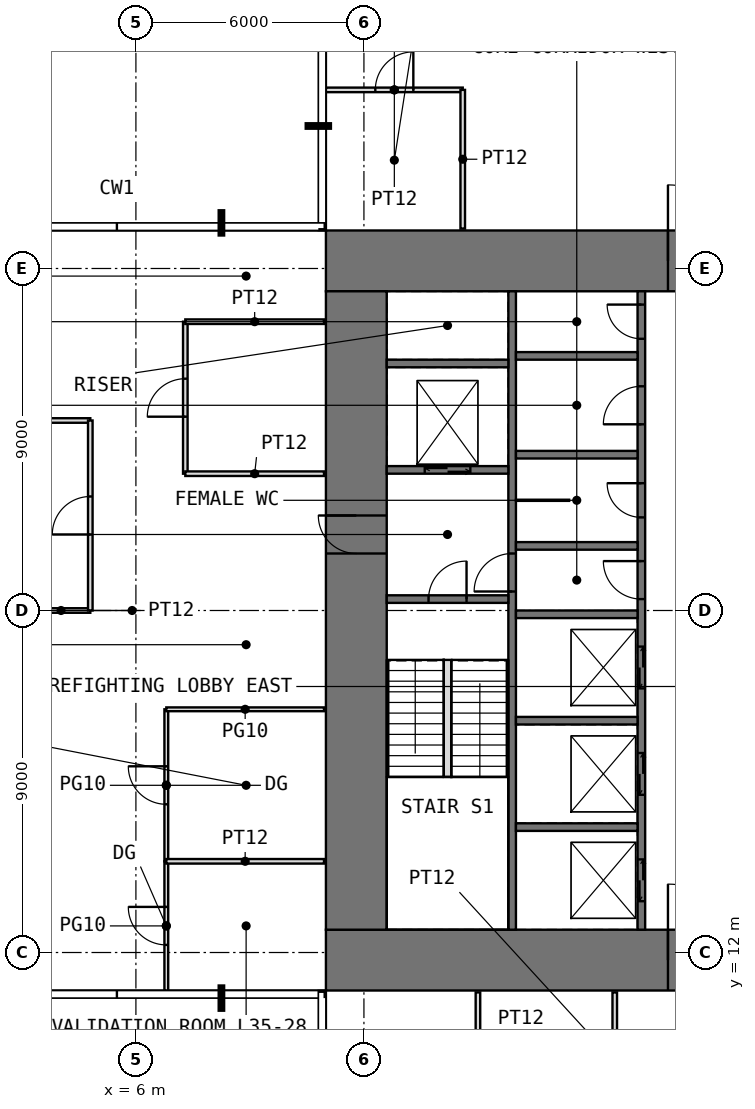
"""IFC4 building model, lengths in metres.
Left out: names, types, materials, properties, quantities, classifications, styles, units other than length and angle.
Written with IfcOpenShell. Run it as: python <this file> out.ifc"""

import sys

from ifc_helpers import new_model, si_unit, direction, frame, frame_2d, origin, place, context, subcontext, project, spatial, rectangle, extrude, element, fill, save


model = new_model("IFC4")
c1 = context("Model", 3, precision=1e-05, world=origin(), true_north=direction((0.0, 1.0)))
c2 = subcontext(c1, "Body", "Model", "MODEL_VIEW")
j1 = project(units=[si_unit("LENGTHUNIT", "METRE"), si_unit("PLANEANGLEUNIT", "RADIAN")], contexts=[c1])
p1 = place(None, origin())
s1 = spatial("IfcSite", under=j1, at=p1, CompositionType="ELEMENT")
p2 = place(p1, origin())
s2 = spatial("IfcBuilding", under=s1, at=p2, CompositionType="ELEMENT")
p3 = place(p2, frame((0.0, 0.0, 148.5)))
s3 = spatial("IfcBuildingStorey", under=s2, at=p3, CompositionType="ELEMENT", Elevation=148.5)
p4 = place(p3, frame((11.0, 11.8, -0.05), z_axis=(0.0, 0.0, 1.0), x_axis=(1.0, 0.0, 0.0)))
e1 = element("IfcWall", 1, at=p4, inside=s3, PredefinedType="SHEAR", context=c2, shape_type="SweptSolid", body=[
    extrude(rectangle(XDim=20.0, YDim=1.6, at=frame_2d((10.0, 0.0))), origin(), (0.0, 0.0, 1.0), 4.0),
])
p5 = place(p4, frame((9.0, 0.0, 0.05)))
e2 = element("IfcOpeningElement", 2, at=p5, cuts=e1, PredefinedType="OPENING", context=c2, shape_type="SweptSolid", body=[
    extrude(rectangle(XDim=2.0, YDim=2.2, at=frame_2d((1.0, 1.1))), frame((0.0, 0.81, 0.0), z_axis=(0.0, -1.0, 0.0), x_axis=(1.0, 0.0, 0.0)), (0.0, 0.0, 1.0), 1.62),
])
p6 = place(p3, frame((11.0, 30.2, -0.05), z_axis=(0.0, 0.0, 1.0), x_axis=(1.0, 0.0, 0.0)))
e3 = element("IfcWall", 3, at=p6, inside=s3, PredefinedType="SHEAR", context=c2, shape_type="SweptSolid", body=[
    extrude(rectangle(XDim=20.0, YDim=1.6, at=frame_2d((10.0, 0.0))), origin(), (0.0, 0.0, 1.0), 4.0),
])
p7 = place(p6, frame((9.0, 0.0, 0.05)))
e4 = element("IfcOpeningElement", 4, at=p7, cuts=e3, PredefinedType="OPENING", context=c2, shape_type="SweptSolid", body=[
    extrude(rectangle(XDim=2.0, YDim=2.2, at=frame_2d((1.0, 1.1))), frame((0.0, 0.81, 0.0), z_axis=(0.0, -1.0, 0.0), x_axis=(1.0, 0.0, 0.0)), (0.0, 0.0, 1.0), 1.62),
])
p8 = place(p3, frame((11.8, 12.6, -0.05), z_axis=(0.0, 0.0, 1.0), x_axis=(0.0, 1.0, 0.0)))
e5 = element("IfcWall", 5, at=p8, inside=s3, PredefinedType="SHEAR", context=c2, shape_type="SweptSolid", body=[
    extrude(rectangle(XDim=16.8, YDim=1.6, at=frame_2d((8.4, 0.0))), origin(), (0.0, 0.0, 1.0), 4.0),
])
p9 = place(p8, frame((9.9, 0.0, 0.05)))
e6 = element("IfcOpeningElement", 6, at=p9, cuts=e5, PredefinedType="OPENING", context=c2, shape_type="SweptSolid", body=[
    extrude(rectangle(XDim=1.0, YDim=2.2, at=frame_2d((0.5, 1.1))), frame((0.0, 0.81, 0.0), z_axis=(0.0, -1.0, 0.0), x_axis=(1.0, 0.0, 0.0)), (0.0, 0.0, 1.0), 1.62),
])
p10 = place(p3, frame((15.9, 12.6, -0.05), z_axis=(0.0, 0.0, 1.0), x_axis=(0.0, 1.0, 0.0)))
e7 = element("IfcWall", 7, at=p10, inside=s3, PredefinedType="SHEAR", context=c2, shape_type="SweptSolid", body=[
    extrude(rectangle(XDim=16.8, YDim=0.2, at=frame_2d((8.4, 0.0))), origin(), (0.0, 0.0, 1.0), 4.0),
])
p11 = place(p10, frame((8.9, 0.0, 0.05)))
e8 = element("IfcOpeningElement", 8, at=p11, cuts=e7, PredefinedType="OPENING", context=c2, shape_type="SweptSolid", body=[
    extrude(rectangle(XDim=1.0, YDim=2.2, at=frame_2d((0.5, 1.1))), frame((0.0, 0.11, 0.0), z_axis=(0.0, -1.0, 0.0), x_axis=(1.0, 0.0, 0.0)), (0.0, 0.0, 1.0), 0.22),
])
p12 = place(p3, frame((19.3, 12.6, -0.05), z_axis=(0.0, 0.0, 1.0), x_axis=(0.0, 1.0, 0.0)))
e9 = element("IfcWall", 9, at=p12, inside=s3, PredefinedType="SHEAR", context=c2, shape_type="SweptSolid", body=[
    extrude(rectangle(XDim=16.8, YDim=0.2, at=frame_2d((8.4, 0.0))), origin(), (0.0, 0.0, 1.0), 4.0),
])
p13 = place(p12, frame((8.7, 0.0, 0.05)))
e10 = element("IfcOpeningElement", 10, at=p13, cuts=e9, PredefinedType="OPENING", context=c2, shape_type="SweptSolid", body=[
    extrude(rectangle(XDim=1.0, YDim=2.2, at=frame_2d((0.5, 1.1))), frame((0.0, 0.11, 0.0), z_axis=(0.0, -1.0, 0.0), x_axis=(1.0, 0.0, 0.0)), (0.0, 0.0, 1.0), 0.22),
])
p14 = place(p12, frame((10.85, 0.0, 0.05)))
e11 = element("IfcOpeningElement", 11, at=p14, cuts=e9, PredefinedType="OPENING", context=c2, shape_type="SweptSolid", body=[
    extrude(rectangle(XDim=0.9, YDim=2.2, at=frame_2d((0.45, 1.1))), frame((0.0, 0.11, 0.0), z_axis=(0.0, -1.0, 0.0), x_axis=(1.0, 0.0, 0.0)), (0.0, 0.0, 1.0), 0.22),
])
p15 = place(p12, frame((13.3, 0.0, 0.05)))
e12 = element("IfcOpeningElement", 12, at=p15, cuts=e9, PredefinedType="OPENING", context=c2, shape_type="SweptSolid", body=[
    extrude(rectangle(XDim=1.0, YDim=2.2, at=frame_2d((0.5, 1.1))), frame((0.0, 0.11, 0.0), z_axis=(0.0, -1.0, 0.0), x_axis=(1.0, 0.0, 0.0)), (0.0, 0.0, 1.0), 0.22),
])
p16 = place(p12, frame((15.55, 0.0, 0.05)))
e13 = element("IfcOpeningElement", 13, at=p16, cuts=e9, PredefinedType="OPENING", context=c2, shape_type="SweptSolid", body=[
    extrude(rectangle(XDim=0.9, YDim=2.2, at=frame_2d((0.45, 1.1))), frame((0.0, 0.11, 0.0), z_axis=(0.0, -1.0, 0.0), x_axis=(1.0, 0.0, 0.0)), (0.0, 0.0, 1.0), 0.22),
])
p17 = place(p12, frame((0.75, 0.0, 0.05)))
e14 = element("IfcOpeningElement", 14, at=p17, cuts=e9, PredefinedType="OPENING", context=c2, shape_type="SweptSolid", body=[
    extrude(rectangle(XDim=1.1, YDim=2.2, at=frame_2d((0.55, 1.1))), frame((0.0, 0.11, 0.0), z_axis=(0.0, -1.0, 0.0), x_axis=(1.0, 0.0, 0.0)), (0.0, 0.0, 1.0), 0.22),
])
p18 = place(p12, frame((3.55, 0.0, 0.05)))
e15 = element("IfcOpeningElement", 15, at=p18, cuts=e9, PredefinedType="OPENING", context=c2, shape_type="SweptSolid", body=[
    extrude(rectangle(XDim=1.1, YDim=2.2, at=frame_2d((0.55, 1.1))), frame((0.0, 0.11, 0.0), z_axis=(0.0, -1.0, 0.0), x_axis=(1.0, 0.0, 0.0)), (0.0, 0.0, 1.0), 0.22),
])
p19 = place(p12, frame((6.35, 0.0, 0.05)))
e16 = element("IfcOpeningElement", 16, at=p19, cuts=e9, PredefinedType="OPENING", context=c2, shape_type="SweptSolid", body=[
    extrude(rectangle(XDim=1.1, YDim=2.2, at=frame_2d((0.55, 1.1))), frame((0.0, 0.11, 0.0), z_axis=(0.0, -1.0, 0.0), x_axis=(1.0, 0.0, 0.0)), (0.0, 0.0, 1.0), 0.22),
])
p20 = place(p3, frame((12.6, 21.3, -0.05), z_axis=(0.0, 0.0, 1.0), x_axis=(1.0, 0.0, 0.0)))
e17 = element("IfcWall", 17, at=p20, inside=s3, PredefinedType="SHEAR", context=c2, shape_type="SweptSolid", body=[
    extrude(rectangle(XDim=3.2, YDim=0.2, at=frame_2d((1.6, 0.0))), origin(), (0.0, 0.0, 1.0), 4.0),
])
p21 = place(p20, frame((1.1, 0.0, 0.05)))
e18 = element("IfcOpeningElement", 18, at=p21, cuts=e17, PredefinedType="OPENING", context=c2, shape_type="SweptSolid", body=[
    extrude(rectangle(XDim=1.0, YDim=2.2, at=frame_2d((0.5, 1.1))), frame((0.0, 0.11, 0.0), z_axis=(0.0, -1.0, 0.0), x_axis=(1.0, 0.0, 0.0)), (0.0, 0.0, 1.0), 0.22),
])
p22 = place(p3, frame((12.6, 24.7, -0.05), z_axis=(0.0, 0.0, 1.0), x_axis=(1.0, 0.0, 0.0)))
e19 = element("IfcWall", 19, at=p22, inside=s3, PredefinedType="SHEAR", context=c2, shape_type="SweptSolid", body=[
    extrude(rectangle(XDim=3.2, YDim=0.2, at=frame_2d((1.6, 0.0))), origin(), (0.0, 0.0, 1.0), 4.0),
])
p23 = place(p22, frame((1.0, 0.0, 0.05)))
e20 = element("IfcOpeningElement", 20, at=p23, cuts=e19, PredefinedType="OPENING", context=c2, shape_type="SweptSolid", body=[
    extrude(rectangle(XDim=1.2, YDim=2.2, at=frame_2d((0.6, 1.1))), frame((0.0, 0.11, 0.0), z_axis=(0.0, -1.0, 0.0), x_axis=(1.0, 0.0, 0.0)), (0.0, 0.0, 1.0), 0.22),
])
for number, where, z_axis, x_axis in (
    (21, (12.6, 27.5, -0.05), (0.0, 0.0, 1.0), (1.0, 0.0, 0.0)),
    (22, (16.0, 15.3, -0.05), (0.0, 0.0, 1.0), (1.0, 0.0, 0.0)),
    (23, (16.0, 18.1, -0.05), (0.0, 0.0, 1.0), (1.0, 0.0, 0.0)),
    (24, (16.0, 20.9, -0.05), (0.0, 0.0, 1.0), (1.0, 0.0, 0.0)),
    (25, (16.0, 22.7, -0.05), (0.0, 0.0, 1.0), (1.0, 0.0, 0.0)),
    (26, (16.0, 25.1, -0.05), (0.0, 0.0, 1.0), (1.0, 0.0, 0.0)),
    (27, (16.0, 27.7, -0.05), (0.0, 0.0, 1.0), (1.0, 0.0, 0.0)),
):
    element("IfcWall", number, at=place(p3, frame(where, z_axis=z_axis, x_axis=x_axis)), inside=s3, PredefinedType="SHEAR", context=c2, shape_type="SweptSolid", body=[
        extrude(rectangle(XDim=3.2, YDim=0.2, at=frame_2d((1.6, 0.0))), origin(), (0.0, 0.0, 1.0), 4.0),
    ])
p24 = place(p3, frame((16.0, 23.9, 0.0), z_axis=(0.0, 0.0, 1.0), x_axis=(1.0, 0.0, 0.0)))
e28 = element("IfcWall", 28, at=p24, inside=s3, PredefinedType="PARTITIONING", context=c2, shape_type="SweptSolid", body=[
    extrude(rectangle(XDim=1.4, YDim=0.03, at=frame_2d((0.7, 0.0))), origin(), (0.0, 0.0, 1.0), 3.75),
])
p25 = place(p3, frame((1.26, 26.0, 0.0), z_axis=(0.0, 0.0, 1.0), x_axis=(1.0, 0.0, 0.0)))
e29 = element("IfcWall", 29, at=p25, inside=s3, PredefinedType="PARTITIONING", context=c2, shape_type="SweptSolid", body=[
    extrude(rectangle(XDim=3.54, YDim=0.12, at=frame_2d((1.77, 0.0))), origin(), (0.0, 0.0, 1.0), 3.75),
])
p26 = place(p3, frame((3.26, 21.0, 0.0), z_axis=(0.0, 0.0, 1.0), x_axis=(1.0, 0.0, 0.0)))
e30 = element("IfcWall", 30, at=p26, inside=s3, PredefinedType="PARTITIONING", context=c2, shape_type="SweptSolid", body=[
    extrude(rectangle(XDim=1.54, YDim=0.12, at=frame_2d((0.77, 0.0))), origin(), (0.0, 0.0, 1.0), 3.75),
])
p27 = place(p3, frame((4.8, 21.0, 0.0), z_axis=(0.0, 0.0, 1.0), x_axis=(0.0, 1.0, 0.0)))
e31 = element("IfcWall", 31, at=p27, inside=s3, PredefinedType="PARTITIONING", context=c2, shape_type="SweptSolid", body=[
    extrude(rectangle(XDim=5.0, YDim=0.12, at=frame_2d((2.5, 0.0))), origin(), (0.0, 0.0, 1.0), 3.75),
])
p28 = place(p27, frame((2.0, 0.0, 0.0)))
e32 = element("IfcOpeningElement", 32, at=p28, cuts=e31, PredefinedType="OPENING", context=c2, shape_type="SweptSolid", body=[
    extrude(rectangle(XDim=1.0, YDim=2.2, at=frame_2d((0.5, 1.1))), frame((0.0, 0.07, 0.0), z_axis=(0.0, -1.0, 0.0), x_axis=(1.0, 0.0, 0.0)), (0.0, 0.0, 1.0), 0.14),
])
p29 = place(p3, frame((6.8, 11.0, 0.0), z_axis=(0.0, 0.0, 1.0), x_axis=(0.0, 1.0, 0.0)))
e33 = element("IfcWall", 33, at=p29, inside=s3, PredefinedType="PARTITIONING", context=c2, shape_type="SweptSolid", body=[
    extrude(rectangle(XDim=3.4, YDim=0.1, at=frame_2d((1.7, 0.0))), origin(), (0.0, 0.0, 1.0), 3.75),
])
p30 = place(p29, frame((1.2, 0.0, 0.0)))
e34 = element("IfcOpeningElement", 34, at=p30, cuts=e33, PredefinedType="OPENING", context=c2, shape_type="SweptSolid", body=[
    extrude(rectangle(XDim=1.0, YDim=2.4, at=frame_2d((0.5, 1.2))), frame((0.0, 0.06, 0.0), z_axis=(0.0, -1.0, 0.0), x_axis=(1.0, 0.0, 0.0)), (0.0, 0.0, 1.0), 0.12),
])
p31 = place(p3, frame((6.8, 14.4, 0.0), z_axis=(0.0, 0.0, 1.0), x_axis=(0.0, 1.0, 0.0)))
e35 = element("IfcWall", 35, at=p31, inside=s3, PredefinedType="PARTITIONING", context=c2, shape_type="SweptSolid", body=[
    extrude(rectangle(XDim=4.0, YDim=0.1, at=frame_2d((2.0, 0.0))), origin(), (0.0, 0.0, 1.0), 3.75),
])
p32 = place(p31, frame((1.5, 0.0, 0.0)))
e36 = element("IfcOpeningElement", 36, at=p32, cuts=e35, PredefinedType="OPENING", context=c2, shape_type="SweptSolid", body=[
    extrude(rectangle(XDim=1.0, YDim=2.4, at=frame_2d((0.5, 1.2))), frame((0.0, 0.06, 0.0), z_axis=(0.0, -1.0, 0.0), x_axis=(1.0, 0.0, 0.0)), (0.0, 0.0, 1.0), 0.12),
])
p33 = place(p3, frame((6.8, 14.4, 0.0), z_axis=(0.0, 0.0, 1.0), x_axis=(1.0, 0.0, 0.0)))
e37 = element("IfcWall", 37, at=p33, inside=s3, PredefinedType="PARTITIONING", context=c2, shape_type="SweptSolid", body=[
    extrude(rectangle(XDim=4.15, YDim=0.12, at=frame_2d((2.075, 0.0))), origin(), (0.0, 0.0, 1.0), 3.75),
])
p34 = place(p3, frame((6.8, 18.4, 0.0), z_axis=(0.0, 0.0, 1.0), x_axis=(1.0, 0.0, 0.0)))
e38 = element("IfcWall", 38, at=p34, inside=s3, PredefinedType="PARTITIONING", context=c2, shape_type="SweptSolid", body=[
    extrude(rectangle(XDim=4.15, YDim=0.1, at=frame_2d((2.075, 0.0))), origin(), (0.0, 0.0, 1.0), 3.75),
])
p35 = place(p3, frame((7.3, 24.6, 0.0), z_axis=(0.0, 0.0, 1.0), x_axis=(0.0, 1.0, 0.0)))
e39 = element("IfcWall", 39, at=p35, inside=s3, PredefinedType="PARTITIONING", context=c2, shape_type="SweptSolid", body=[
    extrude(rectangle(XDim=4.0, YDim=0.12, at=frame_2d((2.0, 0.0))), origin(), (0.0, 0.0, 1.0), 3.75),
])
p36 = place(p35, frame((1.5, 0.0, 0.0)))
e40 = element("IfcOpeningElement", 40, at=p36, cuts=e39, PredefinedType="OPENING", context=c2, shape_type="SweptSolid", body=[
    extrude(rectangle(XDim=1.0, YDim=2.2, at=frame_2d((0.5, 1.1))), frame((0.0, 0.07, 0.0), z_axis=(0.0, -1.0, 0.0), x_axis=(1.0, 0.0, 0.0)), (0.0, 0.0, 1.0), 0.14),
])
for number, where, z_axis, x_axis in (
    (41, (7.3, 24.6, 0.0), (0.0, 0.0, 1.0), (1.0, 0.0, 0.0)),
    (42, (7.3, 28.6, 0.0), (0.0, 0.0, 1.0), (1.0, 0.0, 0.0)),
):
    element("IfcWall", number, at=place(p3, frame(where, z_axis=z_axis, x_axis=x_axis)), inside=s3, PredefinedType="PARTITIONING", context=c2, shape_type="SweptSolid", body=[
        extrude(rectangle(XDim=3.65, YDim=0.12, at=frame_2d((1.825, 0.0))), origin(), (0.0, 0.0, 1.0), 3.75),
    ])
p37 = place(p3, frame((11.0, 34.7, 0.0), z_axis=(0.0, 0.0, 1.0), x_axis=(1.0, 0.0, 0.0)))
e43 = element("IfcWall", 43, at=p37, inside=s3, PredefinedType="PARTITIONING", context=c2, shape_type="SweptSolid", body=[
    extrude(rectangle(XDim=3.6, YDim=0.12, at=frame_2d((1.8, 0.0))), origin(), (0.0, 0.0, 1.0), 3.75),
])
p38 = place(p37, frame((1.3, 0.0, 0.0)))
e44 = element("IfcOpeningElement", 44, at=p38, cuts=e43, PredefinedType="OPENING", context=c2, shape_type="SweptSolid", body=[
    extrude(rectangle(XDim=1.0, YDim=2.2, at=frame_2d((0.5, 1.1))), frame((0.0, 0.07, 0.0), z_axis=(0.0, -1.0, 0.0), x_axis=(1.0, 0.0, 0.0)), (0.0, 0.0, 1.0), 0.14),
])
for number, where, z_axis, x_axis in (
    (45, (14.6, 31.05, 0.0), (0.0, 0.0, 1.0), (0.0, 1.0, 0.0)),
    (46, (15.0, 7.3, 0.0), (0.0, 0.0, 1.0), (0.0, 1.0, 0.0)),
    (47, (18.6, 7.3, 0.0), (0.0, 0.0, 1.0), (0.0, 1.0, 0.0)),
):
    element("IfcWall", number, at=place(p3, frame(where, z_axis=z_axis, x_axis=x_axis)), inside=s3, PredefinedType="PARTITIONING", context=c2, shape_type="SweptSolid", body=[
        extrude(rectangle(XDim=3.65, YDim=0.12, at=frame_2d((1.825, 0.0))), origin(), (0.0, 0.0, 1.0), 3.75),
    ])
p39 = place(p3, frame((14.2, 16.62, 0.0), z_axis=(0.0, 0.0, 1.0), x_axis=(0.0, 1.0, 0.0)))
e48 = element("IfcWall", 48, at=p39, inside=s3, PredefinedType="PARTITIONING", context=c2, shape_type="SweptSolid", body=[
    extrude(rectangle(XDim=3.08, YDim=0.2, at=frame_2d((1.54, 0.0))), origin(), (0.0, 0.0, 1.0), 4.0),
])
p40 = place(p5, origin())
e49 = element("IfcDoor", 49, at=p40, inside=s3, OperationType="DOUBLE_DOOR_SINGLE_SWING", PredefinedType="DOOR", context=c2, shape_type="SweptSolid", body=[
    extrude(rectangle(XDim=2.0, YDim=2.2, at=frame_2d((1.0, 1.1))), frame((0.0, 0.025, 0.0), z_axis=(0.0, -1.0, 0.0), x_axis=(1.0, 0.0, 0.0)), (0.0, 0.0, 1.0), 0.05),
])
fill(e2, e49)
p41 = place(p7, origin())
e50 = element("IfcDoor", 50, at=p41, inside=s3, OperationType="DOUBLE_DOOR_SINGLE_SWING", PredefinedType="DOOR", context=c2, shape_type="SweptSolid", body=[
    extrude(rectangle(XDim=2.0, YDim=2.2, at=frame_2d((1.0, 1.1))), frame((0.0, 0.025, 0.0), z_axis=(0.0, -1.0, 0.0), x_axis=(1.0, 0.0, 0.0)), (0.0, 0.0, 1.0), 0.05),
])
fill(e4, e50)
p42 = place(p9, origin())
e51 = element("IfcDoor", 51, at=p42, inside=s3, OperationType="SINGLE_SWING_RIGHT", PredefinedType="DOOR", context=c2, shape_type="SweptSolid", body=[
    extrude(rectangle(XDim=1.0, YDim=2.2, at=frame_2d((0.5, 1.1))), frame((0.0, 0.025, 0.0), z_axis=(0.0, -1.0, 0.0), x_axis=(1.0, 0.0, 0.0)), (0.0, 0.0, 1.0), 0.05),
])
fill(e6, e51)
p43 = place(p21, origin())
e52 = element("IfcDoor", 52, at=p43, inside=s3, OperationType="SINGLE_SWING_RIGHT", PredefinedType="DOOR", context=c2, shape_type="SweptSolid", body=[
    extrude(rectangle(XDim=1.0, YDim=2.2, at=frame_2d((0.5, 1.1))), frame((0.0, 0.025, 0.0), z_axis=(0.0, -1.0, 0.0), x_axis=(1.0, 0.0, 0.0)), (0.0, 0.0, 1.0), 0.05),
])
fill(e18, e52)
p44 = place(p11, origin())
e53 = element("IfcDoor", 53, at=p44, inside=s3, OperationType="SINGLE_SWING_LEFT", PredefinedType="DOOR", context=c2, shape_type="SweptSolid", body=[
    extrude(rectangle(XDim=1.0, YDim=2.2, at=frame_2d((0.5, 1.1))), frame((0.0, 0.025, 0.0), z_axis=(0.0, -1.0, 0.0), x_axis=(1.0, 0.0, 0.0)), (0.0, 0.0, 1.0), 0.05),
])
fill(e8, e53)
p45 = place(p13, origin())
e54 = element("IfcDoor", 54, at=p45, inside=s3, OperationType="SINGLE_SWING_RIGHT", PredefinedType="DOOR", context=c2, shape_type="SweptSolid", body=[
    extrude(rectangle(XDim=1.0, YDim=2.2, at=frame_2d((0.5, 1.1))), frame((0.0, 0.025, 0.0), z_axis=(0.0, -1.0, 0.0), x_axis=(1.0, 0.0, 0.0)), (0.0, 0.0, 1.0), 0.05),
])
fill(e10, e54)
p46 = place(p14, origin())
e55 = element("IfcDoor", 55, at=p46, inside=s3, OperationType="SINGLE_SWING_RIGHT", PredefinedType="DOOR", context=c2, shape_type="SweptSolid", body=[
    extrude(rectangle(XDim=0.9, YDim=2.2, at=frame_2d((0.45, 1.1))), frame((0.0, 0.025, 0.0), z_axis=(0.0, -1.0, 0.0), x_axis=(1.0, 0.0, 0.0)), (0.0, 0.0, 1.0), 0.05),
])
fill(e11, e55)
p47 = place(p15, origin())
e56 = element("IfcDoor", 56, at=p47, inside=s3, OperationType="SINGLE_SWING_LEFT", PredefinedType="DOOR", context=c2, shape_type="SweptSolid", body=[
    extrude(rectangle(XDim=1.0, YDim=2.2, at=frame_2d((0.5, 1.1))), frame((0.0, 0.025, 0.0), z_axis=(0.0, -1.0, 0.0), x_axis=(1.0, 0.0, 0.0)), (0.0, 0.0, 1.0), 0.05),
])
fill(e12, e56)
p48 = place(p16, origin())
e57 = element("IfcDoor", 57, at=p48, inside=s3, OperationType="SINGLE_SWING_RIGHT", PredefinedType="DOOR", context=c2, shape_type="SweptSolid", body=[
    extrude(rectangle(XDim=0.9, YDim=2.2, at=frame_2d((0.45, 1.1))), frame((0.0, 0.025, 0.0), z_axis=(0.0, -1.0, 0.0), x_axis=(1.0, 0.0, 0.0)), (0.0, 0.0, 1.0), 0.05),
])
fill(e13, e57)
p49 = place(p38, origin())
e58 = element("IfcDoor", 58, at=p49, inside=s3, OperationType="SINGLE_SWING_RIGHT", PredefinedType="DOOR", context=c2, shape_type="SweptSolid", body=[
    extrude(rectangle(XDim=1.0, YDim=2.2, at=frame_2d((0.5, 1.1))), frame((0.0, 0.025, 0.0), z_axis=(0.0, -1.0, 0.0), x_axis=(1.0, 0.0, 0.0)), (0.0, 0.0, 1.0), 0.05),
])
fill(e44, e58)
p50 = place(p30, origin())
e59 = element("IfcDoor", 59, at=p50, inside=s3, OperationType="SINGLE_SWING_RIGHT", PredefinedType="DOOR", context=c2, shape_type="SweptSolid", body=[
    extrude(rectangle(XDim=1.0, YDim=2.4, at=frame_2d((0.5, 1.2))), frame((0.0, 0.025, 0.0), z_axis=(0.0, -1.0, 0.0), x_axis=(1.0, 0.0, 0.0)), (0.0, 0.0, 1.0), 0.05),
])
fill(e34, e59)
p51 = place(p32, origin())
e60 = element("IfcDoor", 60, at=p51, inside=s3, OperationType="SINGLE_SWING_RIGHT", PredefinedType="DOOR", context=c2, shape_type="SweptSolid", body=[
    extrude(rectangle(XDim=1.0, YDim=2.4, at=frame_2d((0.5, 1.2))), frame((0.0, 0.025, 0.0), z_axis=(0.0, -1.0, 0.0), x_axis=(1.0, 0.0, 0.0)), (0.0, 0.0, 1.0), 0.05),
])
fill(e36, e60)
p52 = place(p36, origin())
e61 = element("IfcDoor", 61, at=p52, inside=s3, OperationType="SINGLE_SWING_LEFT", PredefinedType="DOOR", context=c2, shape_type="SweptSolid", body=[
    extrude(rectangle(XDim=1.0, YDim=2.2, at=frame_2d((0.5, 1.1))), frame((0.0, 0.025, 0.0), z_axis=(0.0, -1.0, 0.0), x_axis=(1.0, 0.0, 0.0)), (0.0, 0.0, 1.0), 0.05),
])
fill(e40, e61)
p53 = place(p28, origin())
e62 = element("IfcDoor", 62, at=p53, inside=s3, OperationType="SINGLE_SWING_LEFT", PredefinedType="DOOR", context=c2, shape_type="SweptSolid", body=[
    extrude(rectangle(XDim=1.0, YDim=2.2, at=frame_2d((0.5, 1.1))), frame((0.0, 0.025, 0.0), z_axis=(0.0, -1.0, 0.0), x_axis=(1.0, 0.0, 0.0)), (0.0, 0.0, 1.0), 0.05),
])
fill(e32, e62)
p54 = place(p17, origin())
e63 = element("IfcDoor", 63, at=p54, inside=s3, OperationType="DOUBLE_DOOR_SLIDING", PredefinedType="DOOR", context=c2, shape_type="SweptSolid", body=[
    extrude(rectangle(XDim=1.1, YDim=2.2, at=frame_2d((0.55, 1.1))), frame((0.0, 0.025, 0.0), z_axis=(0.0, -1.0, 0.0), x_axis=(1.0, 0.0, 0.0)), (0.0, 0.0, 1.0), 0.05),
])
fill(e14, e63)
p55 = place(p18, origin())
e64 = element("IfcDoor", 64, at=p55, inside=s3, OperationType="DOUBLE_DOOR_SLIDING", PredefinedType="DOOR", context=c2, shape_type="SweptSolid", body=[
    extrude(rectangle(XDim=1.1, YDim=2.2, at=frame_2d((0.55, 1.1))), frame((0.0, 0.025, 0.0), z_axis=(0.0, -1.0, 0.0), x_axis=(1.0, 0.0, 0.0)), (0.0, 0.0, 1.0), 0.05),
])
fill(e15, e64)
p56 = place(p19, origin())
e65 = element("IfcDoor", 65, at=p56, inside=s3, OperationType="DOUBLE_DOOR_SLIDING", PredefinedType="DOOR", context=c2, shape_type="SweptSolid", body=[
    extrude(rectangle(XDim=1.1, YDim=2.2, at=frame_2d((0.55, 1.1))), frame((0.0, 0.025, 0.0), z_axis=(0.0, -1.0, 0.0), x_axis=(1.0, 0.0, 0.0)), (0.0, 0.0, 1.0), 0.05),
])
fill(e16, e65)
p57 = place(p23, origin())
e66 = element("IfcDoor", 66, at=p57, inside=s3, OperationType="DOUBLE_DOOR_SLIDING", PredefinedType="DOOR", context=c2, shape_type="SweptSolid", body=[
    extrude(rectangle(XDim=1.2, YDim=2.2, at=frame_2d((0.6, 1.1))), frame((0.0, 0.025, 0.0), z_axis=(0.0, -1.0, 0.0), x_axis=(1.0, 0.0, 0.0)), (0.0, 0.0, 1.0), 0.05),
])
fill(e20, e66)
save(model, sys.argv[1])
